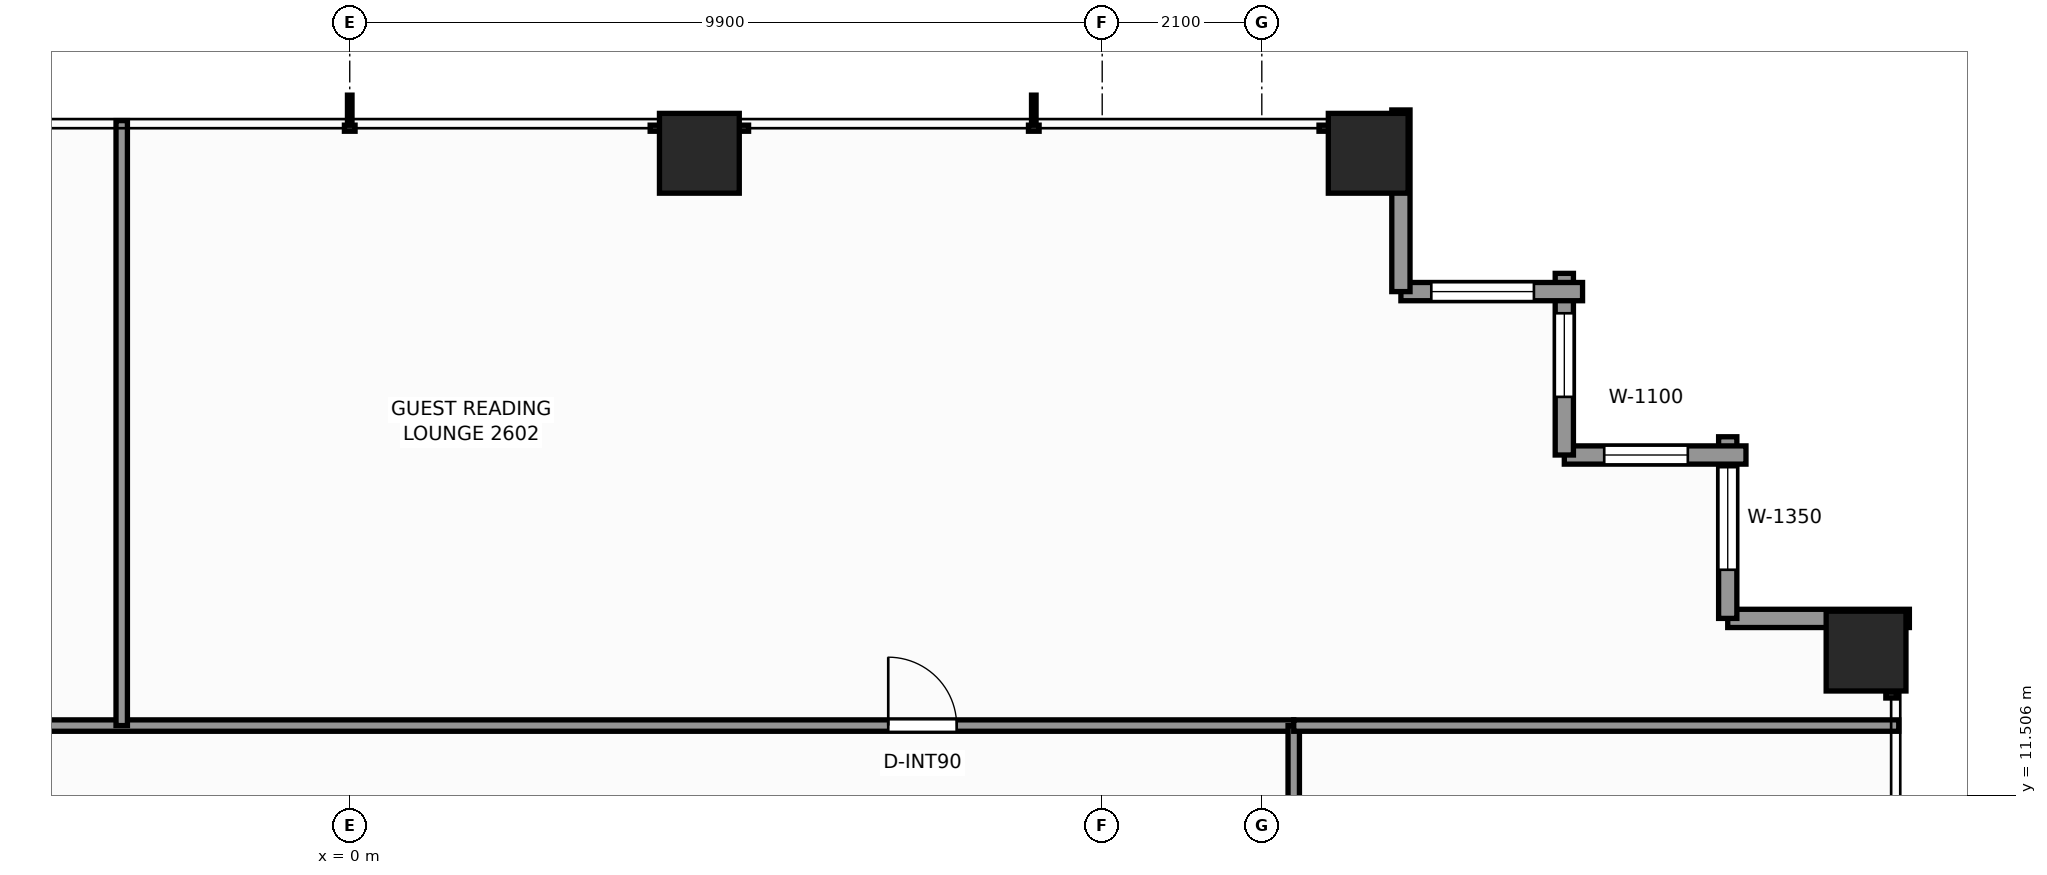
"""IFC4 building model, lengths in metres.
Left out: names, types, materials, properties, quantities, classifications, styles, units other than length and angle.
Written with IfcOpenShell. Run it as: python <this file> out.ifc"""

import sys

from ifc_helpers import new_model, si_unit, direction, frame, frame_2d, origin, origin_2d, place, context, subcontext, project, spatial, rectangle, extrude, element, fill, save


model = new_model("IFC4")
c1 = context("Model", 3, precision=1e-05, world=origin(), true_north=direction((0.0, 1.0)))
c2 = subcontext(c1, "Body", "Model", "MODEL_VIEW")
j1 = project(units=[si_unit("LENGTHUNIT", "METRE"), si_unit("PLANEANGLEUNIT", "RADIAN")], contexts=[c1])
p1 = place(None, origin())
s1 = spatial("IfcSite", under=j1, at=p1, CompositionType="ELEMENT")
p2 = place(p1, origin())
s2 = spatial("IfcBuilding", under=s1, at=p2, CompositionType="ELEMENT")
p3 = place(p2, frame((0.0, 0.0, 92.0)))
s3 = spatial("IfcBuildingStorey", under=s2, at=p3, CompositionType="ELEMENT", Elevation=92.0)
for number, where, z_axis, x_axis in (
    (1, (4.6, 19.95, 0.0), (0.0, 0.0, 1.0), (1.0, 0.0, 0.0)),
    (2, (13.4, 19.95, 0.0), (0.0, 0.0, 1.0), (1.0, 0.0, 0.0)),
    (3, (19.95, 13.4, 0.0), (0.0, 0.0, 1.0), (1.0, 0.0, 0.0)),
):
    element("IfcColumn", number, at=place(p3, frame(where, z_axis=z_axis, x_axis=x_axis)), inside=s3, PredefinedType="COLUMN", context=c2, shape_type="SweptSolid", body=[
        extrude(rectangle(XDim=1.05, YDim=1.05, at=origin_2d()), origin(), (0.0, 0.0, 1.0), 3.3),
    ])
p4 = place(p3, frame((18.13, 13.83, 0.0), z_axis=(0.0, 0.0, 1.0), x_axis=(1.0, 0.0, 0.0)))
e4 = element("IfcWall", 4, at=p4, inside=s3, PredefinedType="STANDARD", context=c2, shape_type="SweptSolid", body=[
    extrude(rectangle(XDim=2.39, YDim=0.24, at=frame_2d((1.195, 0.0))), origin(), (0.0, 0.0, 1.0), 2.459),
])
p5 = place(p3, frame((18.13, 16.22, 0.0), z_axis=(0.0, 0.0, 1.0), x_axis=(0.0, -1.0, 0.0)))
e5 = element("IfcWall", 5, at=p5, inside=s3, PredefinedType="STANDARD", context=c2, shape_type="SweptSolid", body=[
    extrude(rectangle(XDim=2.39, YDim=0.24, at=frame_2d((1.195, 0.0))), origin(), (0.0, 0.0, 1.0), 2.459),
])
p6 = place(p5, frame((0.4, 0.0, 0.65)))
e6 = element("IfcOpeningElement", 6, at=p6, cuts=e5, PredefinedType="OPENING", context=c2, shape_type="SweptSolid", body=[
    extrude(rectangle(XDim=1.35, YDim=1.55, at=frame_2d((0.675, 0.775))), frame((0.0, 0.13, 0.0), z_axis=(0.0, -1.0, 0.0), x_axis=(1.0, 0.0, 0.0)), (0.0, 0.0, 1.0), 0.26),
])
p7 = place(p3, frame((15.98, 15.98, 0.0), z_axis=(0.0, 0.0, 1.0), x_axis=(1.0, 0.0, 0.0)))
e7 = element("IfcWall", 7, at=p7, inside=s3, PredefinedType="STANDARD", context=c2, shape_type="SweptSolid", body=[
    extrude(rectangle(XDim=2.39, YDim=0.24, at=frame_2d((1.195, 0.0))), origin(), (0.0, 0.0, 1.0), 2.459),
])
p8 = place(p7, frame((0.525, 0.0, 0.65)))
e8 = element("IfcOpeningElement", 8, at=p8, cuts=e7, PredefinedType="OPENING", context=c2, shape_type="SweptSolid", body=[
    extrude(rectangle(XDim=1.1, YDim=1.45, at=frame_2d((0.55, 0.725))), frame((0.0, 0.13, 0.0), z_axis=(0.0, -1.0, 0.0), x_axis=(1.0, 0.0, 0.0)), (0.0, 0.0, 1.0), 0.26),
])
p9 = place(p3, frame((15.98, 18.37, 0.0), z_axis=(0.0, 0.0, 1.0), x_axis=(0.0, -1.0, 0.0)))
e9 = element("IfcWall", 9, at=p9, inside=s3, PredefinedType="STANDARD", context=c2, shape_type="SweptSolid", body=[
    extrude(rectangle(XDim=2.39, YDim=0.24, at=frame_2d((1.195, 0.0))), origin(), (0.0, 0.0, 1.0), 2.459),
])
p10 = place(p9, frame((0.525, 0.0, 0.65)))
e10 = element("IfcOpeningElement", 10, at=p10, cuts=e9, PredefinedType="OPENING", context=c2, shape_type="SweptSolid", body=[
    extrude(rectangle(XDim=1.1, YDim=1.45, at=frame_2d((0.55, 0.725))), frame((0.0, 0.13, 0.0), z_axis=(0.0, -1.0, 0.0), x_axis=(1.0, 0.0, 0.0)), (0.0, 0.0, 1.0), 0.26),
])
p11 = place(p3, frame((13.83, 18.13, 0.0), z_axis=(0.0, 0.0, 1.0), x_axis=(1.0, 0.0, 0.0)))
e11 = element("IfcWall", 11, at=p11, inside=s3, PredefinedType="STANDARD", context=c2, shape_type="SweptSolid", body=[
    extrude(rectangle(XDim=2.39, YDim=0.24, at=frame_2d((1.195, 0.0))), origin(), (0.0, 0.0, 1.0), 2.459),
])
p12 = place(p11, frame((0.4, 0.0, 0.65)))
e12 = element("IfcOpeningElement", 12, at=p12, cuts=e11, PredefinedType="OPENING", context=c2, shape_type="SweptSolid", body=[
    extrude(rectangle(XDim=1.35, YDim=1.55, at=frame_2d((0.675, 0.775))), frame((0.0, 0.13, 0.0), z_axis=(0.0, -1.0, 0.0), x_axis=(1.0, 0.0, 0.0)), (0.0, 0.0, 1.0), 0.26),
])
p13 = place(p3, frame((13.83, 20.52, 0.0), z_axis=(0.0, 0.0, 1.0), x_axis=(0.0, -1.0, 0.0)))
e13 = element("IfcWall", 13, at=p13, inside=s3, PredefinedType="STANDARD", context=c2, shape_type="SweptSolid", body=[
    extrude(rectangle(XDim=2.39, YDim=0.24, at=frame_2d((1.195, 0.0))), origin(), (0.0, 0.0, 1.0), 2.459),
])
p14 = place(p3, frame((-12.26, 12.42, 0.0), z_axis=(0.0, 0.0, 1.0), x_axis=(1.0, 0.0, 0.0)))
e14 = element("IfcWall", 14, at=p14, inside=s3, PredefinedType="PARTITIONING", context=c2, shape_type="SweptSolid", body=[
    extrude(rectangle(XDim=24.68, YDim=0.15, at=frame_2d((12.34, 0.0))), origin(), (0.0, 0.0, 1.0), 2.292),
])
p15 = place(p14, frame((4.275, 0.0, 0.0)))
e15 = element("IfcOpeningElement", 15, at=p15, cuts=e14, PredefinedType="OPENING", context=c2, shape_type="SweptSolid", body=[
    extrude(rectangle(XDim=0.9, YDim=2.06, at=frame_2d((0.45, 1.03))), frame((0.0, 0.085, 0.0), z_axis=(0.0, -1.0, 0.0), x_axis=(1.0, 0.0, 0.0)), (0.0, 0.0, 1.0), 0.17),
])
p16 = place(p14, frame((19.345, 0.0, 0.0)))
e16 = element("IfcOpeningElement", 16, at=p16, cuts=e14, PredefinedType="OPENING", context=c2, shape_type="SweptSolid", body=[
    extrude(rectangle(XDim=0.9, YDim=2.06, at=frame_2d((0.45, 1.03))), frame((0.0, 0.085, 0.0), z_axis=(0.0, -1.0, 0.0), x_axis=(1.0, 0.0, 0.0)), (0.0, 0.0, 1.0), 0.17),
])
p17 = place(p3, frame((12.42, -12.42, 0.0), z_axis=(0.0, 0.0, 1.0), x_axis=(0.0, 1.0, 0.0)))
e17 = element("IfcWall", 17, at=p17, inside=s3, PredefinedType="PARTITIONING", context=c2, shape_type="SweptSolid", body=[
    extrude(rectangle(XDim=24.84, YDim=0.15, at=frame_2d((12.42, 0.0))), origin(), (0.0, 0.0, 1.0), 2.292),
])
p18 = place(p17, frame((4.435, 0.0, 0.0)))
e18 = element("IfcOpeningElement", 18, at=p18, cuts=e17, PredefinedType="OPENING", context=c2, shape_type="SweptSolid", body=[
    extrude(rectangle(XDim=0.9, YDim=2.06, at=frame_2d((0.45, 1.03))), frame((0.0, 0.085, 0.0), z_axis=(0.0, -1.0, 0.0), x_axis=(1.0, 0.0, 0.0)), (0.0, 0.0, 1.0), 0.17),
])
p19 = place(p17, frame((19.505, 0.0, 0.0)))
e19 = element("IfcOpeningElement", 19, at=p19, cuts=e17, PredefinedType="OPENING", context=c2, shape_type="SweptSolid", body=[
    extrude(rectangle(XDim=0.9, YDim=2.06, at=frame_2d((0.45, 1.03))), frame((0.0, 0.085, 0.0), z_axis=(0.0, -1.0, 0.0), x_axis=(1.0, 0.0, 0.0)), (0.0, 0.0, 1.0), 0.17),
])
p20 = place(p3, frame((12.42, 12.42, 0.0), z_axis=(0.0, 0.0, 1.0), x_axis=(1.0, 0.0, 0.0)))
e20 = element("IfcWall", 20, at=p20, inside=s3, PredefinedType="PARTITIONING", context=c2, shape_type="SweptSolid", body=[
    extrude(rectangle(XDim=7.96, YDim=0.15, at=frame_2d((3.98, 0.0))), origin(), (0.0, 0.0, 1.0), 2.292),
])
p21 = place(p3, frame((-3.0, 12.42, 0.0), z_axis=(0.0, 0.0, 1.0), x_axis=(0.0, 1.0, 0.0)))
e21 = element("IfcWall", 21, at=p21, inside=s3, PredefinedType="PARTITIONING", context=c2, shape_type="SweptSolid", body=[
    extrude(rectangle(XDim=7.96, YDim=0.15, at=frame_2d((3.98, 0.0))), origin(), (0.0, 0.0, 1.0), 2.449),
])
p22 = place(p6, origin())
e22 = element("IfcWindow", 22, at=p22, inside=s3, PartitioningType="SINGLE_PANEL", PredefinedType="WINDOW", context=c2, shape_type="SweptSolid", body=[
    extrude(rectangle(XDim=1.35, YDim=1.55, at=frame_2d((0.675, 0.775))), frame((0.0, 0.03, 0.0), z_axis=(0.0, -1.0, 0.0), x_axis=(1.0, 0.0, 0.0)), (0.0, 0.0, 1.0), 0.06),
])
fill(e6, e22)
p23 = place(p8, origin())
e23 = element("IfcWindow", 23, at=p23, inside=s3, PartitioningType="SINGLE_PANEL", PredefinedType="WINDOW", context=c2, shape_type="SweptSolid", body=[
    extrude(rectangle(XDim=1.1, YDim=1.45, at=frame_2d((0.55, 0.725))), frame((0.0, 0.03, 0.0), z_axis=(0.0, -1.0, 0.0), x_axis=(1.0, 0.0, 0.0)), (0.0, 0.0, 1.0), 0.06),
])
fill(e8, e23)
p24 = place(p10, origin())
e24 = element("IfcWindow", 24, at=p24, inside=s3, PartitioningType="SINGLE_PANEL", PredefinedType="WINDOW", context=c2, shape_type="SweptSolid", body=[
    extrude(rectangle(XDim=1.1, YDim=1.45, at=frame_2d((0.55, 0.725))), frame((0.0, 0.03, 0.0), z_axis=(0.0, -1.0, 0.0), x_axis=(1.0, 0.0, 0.0)), (0.0, 0.0, 1.0), 0.06),
])
fill(e10, e24)
p25 = place(p12, origin())
e25 = element("IfcWindow", 25, at=p25, inside=s3, PartitioningType="SINGLE_PANEL", PredefinedType="WINDOW", context=c2, shape_type="SweptSolid", body=[
    extrude(rectangle(XDim=1.35, YDim=1.55, at=frame_2d((0.675, 0.775))), frame((0.0, 0.03, 0.0), z_axis=(0.0, -1.0, 0.0), x_axis=(1.0, 0.0, 0.0)), (0.0, 0.0, 1.0), 0.06),
])
fill(e12, e25)
p26 = place(p16, origin())
e26 = element("IfcDoor", 26, at=p26, inside=s3, OperationType="SINGLE_SWING_LEFT", PredefinedType="DOOR", context=c2, shape_type="SweptSolid", body=[
    extrude(rectangle(XDim=0.9, YDim=2.06, at=frame_2d((0.45, 1.03))), frame((0.0, 0.025, 0.0), z_axis=(0.0, -1.0, 0.0), x_axis=(1.0, 0.0, 0.0)), (0.0, 0.0, 1.0), 0.05),
])
fill(e16, e26)
save(model, sys.argv[1])
